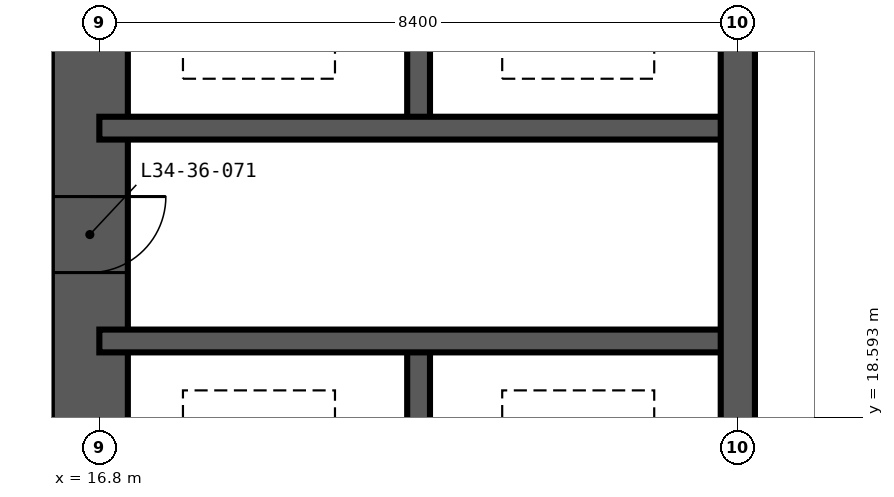
"""IFC4 building model, lengths in metres.
Left out: names, types, materials, properties, quantities, classifications, styles, units other than length and angle.
Written with IfcOpenShell. Run it as: python <this file> out.ifc"""

import sys

from ifc_helpers import new_model, si_unit, direction, frame, frame_2d, origin, place, context, subcontext, project, spatial, rectangle, extrude, element, fill, save


model = new_model("IFC4")
c1 = context("Model", 3, precision=1e-05, world=origin(), true_north=direction((0.0, 1.0)))
c2 = subcontext(c1, "Body", "Model", "MODEL_VIEW")
j1 = project(units=[si_unit("LENGTHUNIT", "METRE"), si_unit("PLANEANGLEUNIT", "RADIAN")], contexts=[c1])
p1 = place(None, origin())
s1 = spatial("IfcSite", under=j1, at=p1, CompositionType="ELEMENT")
p2 = place(p1, origin())
s2 = spatial("IfcBuilding", under=s1, at=p2, CompositionType="ELEMENT")
p3 = place(p2, frame((0.0, 0.0, 133.2)))
s3 = spatial("IfcBuildingStorey", under=s2, at=p3, CompositionType="ELEMENT", Elevation=133.2)
p4 = place(p3, frame((16.675, 41.625, -0.35), z_axis=(0.0, 0.0, 1.0), x_axis=(0.0, -1.0, 0.0)))
e1 = element("IfcWall", 1, at=p4, inside=s3, PredefinedType="SHEAR", context=c2, shape_type="SweptSolid", body=[
    extrude(rectangle(XDim=24.45, YDim=1.0, at=frame_2d((12.225, 0.0))), origin(), (0.0, 0.0, 1.0), 3.6),
])
p5 = place(p4, frame((11.325, 0.0, 0.35)))
e2 = element("IfcOpeningElement", 2, at=p5, cuts=e1, PredefinedType="OPENING", context=c2, shape_type="SweptSolid", body=[
    extrude(rectangle(XDim=1.8, YDim=2.2, at=frame_2d((0.9, 1.1))), frame((0.0, 0.51, 0.0), z_axis=(0.0, -1.0, 0.0), x_axis=(1.0, 0.0, 0.0)), (0.0, 0.0, 1.0), 1.02),
])
p6 = place(p4, frame((20.125, 0.0, 0.35)))
e3 = element("IfcOpeningElement", 3, at=p6, cuts=e1, PredefinedType="OPENING", context=c2, shape_type="SweptSolid", body=[
    extrude(rectangle(XDim=1.0, YDim=2.1, at=frame_2d((0.5, 1.05))), frame((0.0, 0.51, 0.0), z_axis=(0.0, -1.0, 0.0), x_axis=(1.0, 0.0, 0.0)), (0.0, 0.0, 1.0), 1.02),
])
p7 = place(p4, frame((5.425, 0.0, 0.35)))
e4 = element("IfcOpeningElement", 4, at=p7, cuts=e1, PredefinedType="OPENING", context=c2, shape_type="SweptSolid", body=[
    extrude(rectangle(XDim=1.0, YDim=2.1, at=frame_2d((0.5, 1.05))), frame((0.0, 0.51, 0.0), z_axis=(0.0, -1.0, 0.0), x_axis=(1.0, 0.0, 0.0)), (0.0, 0.0, 1.0), 1.02),
])
p8 = place(p3, frame((21.0, 16.8, -0.35), z_axis=(0.0, 0.0, 1.0), x_axis=(0.0, 1.0, 0.0)))
e5 = element("IfcWall", 5, at=p8, inside=s3, PredefinedType="SHEAR", context=c2, shape_type="SweptSolid", body=[
    extrude(rectangle(XDim=2.8, YDim=0.3, at=frame_2d((1.4, 0.0))), origin(), (0.0, 0.0, 1.0), 3.6),
])
p9 = place(p3, frame((21.0, 22.4, -0.35), z_axis=(0.0, 0.0, 1.0), x_axis=(0.0, 1.0, 0.0)))
e6 = element("IfcWall", 6, at=p9, inside=s3, PredefinedType="SHEAR", context=c2, shape_type="SweptSolid", body=[
    extrude(rectangle(XDim=5.6, YDim=0.3, at=frame_2d((2.8, 0.0))), origin(), (0.0, 0.0, 1.0), 3.6),
])
for number, where, z_axis, x_axis in (
    (7, (16.8, 19.6, -0.35), (0.0, 0.0, 1.0), (1.0, 0.0, 0.0)),
    (8, (16.8, 22.4, -0.35), (0.0, 0.0, 1.0), (1.0, 0.0, 0.0)),
):
    element("IfcWall", number, at=place(p3, frame(where, z_axis=z_axis, x_axis=x_axis)), inside=s3, PredefinedType="SHEAR", context=c2, shape_type="SweptSolid", body=[
        extrude(rectangle(XDim=8.4, YDim=0.3, at=frame_2d((4.2, 0.0))), origin(), (0.0, 0.0, 1.0), 3.6),
    ])
p10 = place(p3, frame((25.2, 16.8, -0.35), z_axis=(0.0, 0.0, 1.0), x_axis=(0.0, 1.0, 0.0)))
e9 = element("IfcWall", 9, at=p10, inside=s3, PredefinedType="SHEAR", context=c2, shape_type="SweptSolid", body=[
    extrude(rectangle(XDim=25.2, YDim=0.45, at=frame_2d((12.6, 0.0))), origin(), (0.0, 0.0, 1.0), 3.6),
])
p11 = place(p10, frame((12.1, 0.0, 0.35)))
e10 = element("IfcOpeningElement", 10, at=p11, cuts=e9, PredefinedType="OPENING", context=c2, shape_type="SweptSolid", body=[
    extrude(rectangle(XDim=1.0, YDim=2.1, at=frame_2d((0.5, 1.05))), frame((0.0, 0.235, 0.0), z_axis=(0.0, -1.0, 0.0), x_axis=(1.0, 0.0, 0.0)), (0.0, 0.0, 1.0), 0.47),
])
p12 = place(p6, origin())
e11 = element("IfcDoor", 11, at=p12, inside=s3, OperationType="SINGLE_SWING_LEFT", PredefinedType="DOOR", context=c2, shape_type="SweptSolid", body=[
    extrude(rectangle(XDim=1.0, YDim=2.1, at=frame_2d((0.5, 1.05))), frame((0.0, 0.025, 0.0), z_axis=(0.0, -1.0, 0.0), x_axis=(1.0, 0.0, 0.0)), (0.0, 0.0, 1.0), 0.05),
])
fill(e3, e11)
save(model, sys.argv[1])
